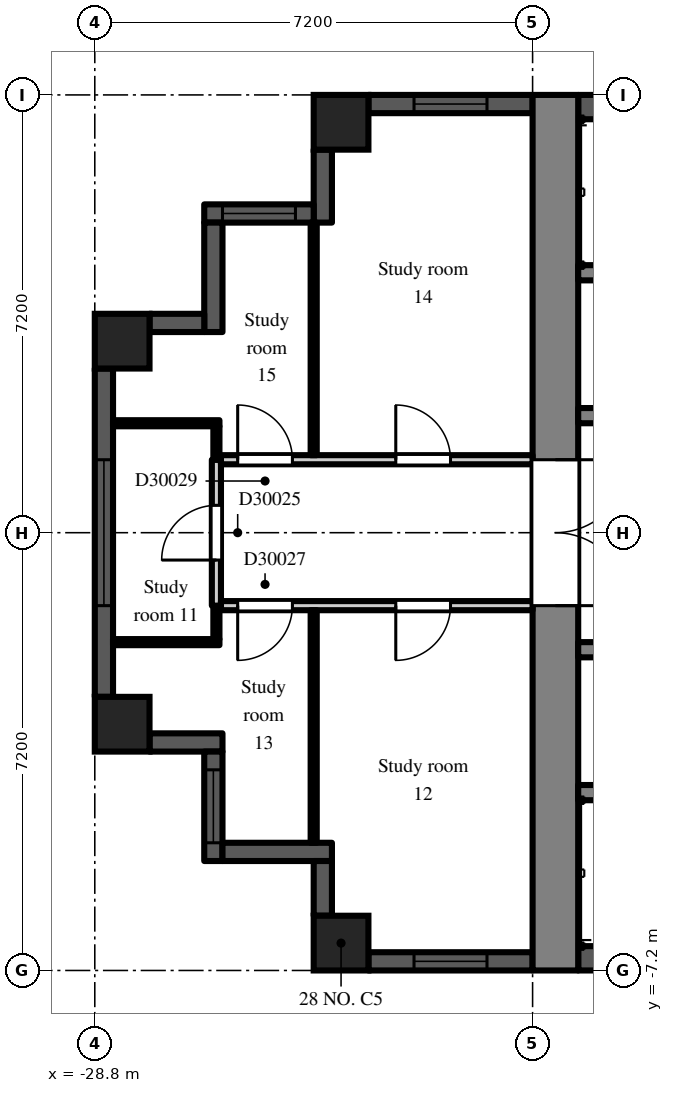
"""IFC4 building model, lengths in metres.
Left out: names, types, materials, properties, quantities, classifications, styles, units other than length and angle.
Written with IfcOpenShell. Run it as: python <this file> out.ifc"""

import sys

from ifc_helpers import new_model, si_unit, direction, frame, frame_2d, origin, origin_2d, place, context, subcontext, project, spatial, rectangle, extrude, element, fill, save


model = new_model("IFC4")
c1 = context("Model", 3, precision=1e-05, world=origin(), true_north=direction((0.0, 1.0)))
c2 = subcontext(c1, "Body", "Model", "MODEL_VIEW")
j1 = project(units=[si_unit("LENGTHUNIT", "METRE"), si_unit("PLANEANGLEUNIT", "RADIAN")], contexts=[c1])
p1 = place(None, origin())
s1 = spatial("IfcSite", under=j1, at=p1, CompositionType="ELEMENT")
p2 = place(p1, origin())
s2 = spatial("IfcBuilding", under=s1, at=p2, CompositionType="ELEMENT")
p3 = place(p2, frame((0.0, 0.0, 207.9)))
s3 = spatial("IfcBuildingStorey", under=s2, at=p3, CompositionType="ELEMENT", Elevation=207.9)
for number, where, z_axis, x_axis in (
    (1, (-28.35, -3.15, 0.0), (0.0, 0.0, 1.0), (1.0, 0.0, 0.0)),
    (2, (-28.35, 3.15, 0.0), (0.0, 0.0, 1.0), (1.0, 0.0, 0.0)),
    (3, (-24.75, -6.75, 0.0), (0.0, 0.0, 1.0), (1.0, 0.0, 0.0)),
    (4, (-24.75, 6.75, 0.0), (0.0, 0.0, 1.0), (1.0, 0.0, 0.0)),
):
    element("IfcColumn", number, at=place(p3, frame(where, z_axis=z_axis, x_axis=x_axis)), inside=s3, PredefinedType="COLUMN", context=c2, shape_type="SweptSolid", body=[
        extrude(rectangle(XDim=0.9, YDim=0.9, at=origin_2d()), origin(), (0.0, 0.0, 1.0), 3.0),
    ])
p4 = place(p3, frame((-21.6, 7.05, 0.0), z_axis=(0.0, 0.0, 1.0), x_axis=(-1.0, 0.0, 0.0)))
e5 = element("IfcWall", 5, at=p4, inside=s3, PredefinedType="SOLIDWALL", context=c2, shape_type="SweptSolid", body=[
    extrude(rectangle(XDim=2.7, YDim=0.3, at=frame_2d((1.35, 0.0))), origin(), (0.0, 0.0, 1.0), 2.3),
])
p5 = place(p4, frame((0.75, 0.0, 0.2)))
e6 = element("IfcOpeningElement", 6, at=p5, cuts=e5, PredefinedType="OPENING", context=c2, shape_type="SweptSolid", body=[
    extrude(rectangle(XDim=1.2, YDim=1.85, at=frame_2d((0.6, 0.925))), frame((0.0, 0.16, 0.0), z_axis=(0.0, -1.0, 0.0), x_axis=(1.0, 0.0, 0.0)), (0.0, 0.0, 1.0), 0.32),
])
p6 = place(p3, frame((-25.05, 6.3, 0.0), z_axis=(0.0, 0.0, 1.0), x_axis=(0.0, -1.0, 0.0)))
e7 = element("IfcWall", 7, at=p6, inside=s3, PredefinedType="SOLIDWALL", context=c2, shape_type="SweptSolid", body=[
    extrude(rectangle(XDim=1.2, YDim=0.3, at=frame_2d((0.6, 0.0))), origin(), (0.0, 0.0, 1.0), 2.6),
])
p7 = place(p3, frame((-25.2, 5.25, 0.0), z_axis=(0.0, 0.0, 1.0), x_axis=(-1.0, 0.0, 0.0)))
e8 = element("IfcWall", 8, at=p7, inside=s3, PredefinedType="SOLIDWALL", context=c2, shape_type="SweptSolid", body=[
    extrude(rectangle(XDim=1.8, YDim=0.3, at=frame_2d((0.9, 0.0))), origin(), (0.0, 0.0, 1.0), 2.6),
])
p8 = place(p7, frame((0.3, 0.0, 0.2)))
e9 = element("IfcOpeningElement", 9, at=p8, cuts=e8, PredefinedType="OPENING", context=c2, shape_type="SweptSolid", body=[
    extrude(rectangle(XDim=1.2, YDim=1.85, at=frame_2d((0.6, 0.925))), frame((0.0, 0.16, 0.0), z_axis=(0.0, -1.0, 0.0), x_axis=(1.0, 0.0, 0.0)), (0.0, 0.0, 1.0), 0.32),
])
p9 = place(p3, frame((-26.85, 5.1, 0.0), z_axis=(0.0, 0.0, 1.0), x_axis=(0.0, -1.0, 0.0)))
e10 = element("IfcWall", 10, at=p9, inside=s3, PredefinedType="SOLIDWALL", context=c2, shape_type="SweptSolid", body=[
    extrude(rectangle(XDim=1.8, YDim=0.3, at=frame_2d((0.9, 0.0))), origin(), (0.0, 0.0, 1.0), 2.6),
])
p10 = place(p3, frame((-27.0, 3.45, 0.0), z_axis=(0.0, 0.0, 1.0), x_axis=(-1.0, 0.0, 0.0)))
e11 = element("IfcWall", 11, at=p10, inside=s3, PredefinedType="SOLIDWALL", context=c2, shape_type="SweptSolid", body=[
    extrude(rectangle(XDim=0.9, YDim=0.3, at=frame_2d((0.45, 0.0))), origin(), (0.0, 0.0, 1.0), 2.6),
])
p11 = place(p3, frame((-28.65, 2.7, 0.0), z_axis=(0.0, 0.0, 1.0), x_axis=(0.0, -1.0, 0.0)))
e12 = element("IfcWall", 12, at=p11, inside=s3, PredefinedType="SOLIDWALL", context=c2, shape_type="SweptSolid", body=[
    extrude(rectangle(XDim=5.4, YDim=0.3, at=frame_2d((2.7, 0.0))), origin(), (0.0, 0.0, 1.0), 2.3),
])
p12 = place(p11, frame((1.5, 0.0, 0.2)))
e13 = element("IfcOpeningElement", 13, at=p12, cuts=e12, PredefinedType="OPENING", context=c2, shape_type="SweptSolid", body=[
    extrude(rectangle(XDim=2.4, YDim=1.85, at=frame_2d((1.2, 0.925))), frame((0.0, 0.16, 0.0), z_axis=(0.0, -1.0, 0.0), x_axis=(1.0, 0.0, 0.0)), (0.0, 0.0, 1.0), 0.32),
])
p13 = place(p3, frame((-27.9, -3.45, 0.0), z_axis=(0.0, 0.0, 1.0), x_axis=(1.0, 0.0, 0.0)))
e14 = element("IfcWall", 14, at=p13, inside=s3, PredefinedType="SOLIDWALL", context=c2, shape_type="SweptSolid", body=[
    extrude(rectangle(XDim=1.2, YDim=0.3, at=frame_2d((0.6, 0.0))), origin(), (0.0, 0.0, 1.0), 2.6),
])
p14 = place(p3, frame((-26.85, -3.6, 0.0), z_axis=(0.0, 0.0, 1.0), x_axis=(0.0, -1.0, 0.0)))
e15 = element("IfcWall", 15, at=p14, inside=s3, PredefinedType="SOLIDWALL", context=c2, shape_type="SweptSolid", body=[
    extrude(rectangle(XDim=1.8, YDim=0.3, at=frame_2d((0.9, 0.0))), origin(), (0.0, 0.0, 1.0), 2.6),
])
p15 = place(p14, frame((0.3, 0.0, 0.2)))
e16 = element("IfcOpeningElement", 16, at=p15, cuts=e15, PredefinedType="OPENING", context=c2, shape_type="SweptSolid", body=[
    extrude(rectangle(XDim=1.2, YDim=1.85, at=frame_2d((0.6, 0.925))), frame((0.0, 0.16, 0.0), z_axis=(0.0, -1.0, 0.0), x_axis=(1.0, 0.0, 0.0)), (0.0, 0.0, 1.0), 0.32),
])
p16 = place(p3, frame((-26.7, -5.25, 0.0), z_axis=(0.0, 0.0, 1.0), x_axis=(1.0, 0.0, 0.0)))
e17 = element("IfcWall", 17, at=p16, inside=s3, PredefinedType="SOLIDWALL", context=c2, shape_type="SweptSolid", body=[
    extrude(rectangle(XDim=1.8, YDim=0.3, at=frame_2d((0.9, 0.0))), origin(), (0.0, 0.0, 1.0), 2.6),
])
p17 = place(p3, frame((-25.05, -5.4, 0.0), z_axis=(0.0, 0.0, 1.0), x_axis=(0.0, -1.0, 0.0)))
e18 = element("IfcWall", 18, at=p17, inside=s3, PredefinedType="SOLIDWALL", context=c2, shape_type="SweptSolid", body=[
    extrude(rectangle(XDim=0.9, YDim=0.3, at=frame_2d((0.45, 0.0))), origin(), (0.0, 0.0, 1.0), 2.6),
])
p18 = place(p3, frame((-24.3, -7.05, 0.0), z_axis=(0.0, 0.0, 1.0), x_axis=(1.0, 0.0, 0.0)))
e19 = element("IfcWall", 19, at=p18, inside=s3, PredefinedType="SOLIDWALL", context=c2, shape_type="SweptSolid", body=[
    extrude(rectangle(XDim=2.7, YDim=0.3, at=frame_2d((1.35, 0.0))), origin(), (0.0, 0.0, 1.0), 2.3),
])
p19 = place(p18, frame((0.75, 0.0, 0.2)))
e20 = element("IfcOpeningElement", 20, at=p19, cuts=e19, PredefinedType="OPENING", context=c2, shape_type="SweptSolid", body=[
    extrude(rectangle(XDim=1.2, YDim=1.85, at=frame_2d((0.6, 0.925))), frame((0.0, 0.16, 0.0), z_axis=(0.0, -1.0, 0.0), x_axis=(1.0, 0.0, 0.0)), (0.0, 0.0, 1.0), 0.32),
])
p20 = place(p3, frame((-21.225, -7.2, 0.0), z_axis=(0.0, 0.0, 1.0), x_axis=(0.0, 1.0, 0.0)))
e21 = element("IfcWall", 21, at=p20, inside=s3, PredefinedType="SHEAR", context=c2, shape_type="SweptSolid", body=[
    extrude(rectangle(XDim=14.4, YDim=0.75, at=frame_2d((7.2, 0.0))), origin(), (0.0, 0.0, 1.0), 2.6),
])
p21 = place(p20, frame((6.0, 0.0, 0.0)))
e22 = element("IfcOpeningElement", 22, at=p21, cuts=e21, PredefinedType="OPENING", context=c2, shape_type="SweptSolid", body=[
    extrude(rectangle(XDim=2.4, YDim=2.2, at=frame_2d((1.2, 1.1))), frame((0.0, 0.385, 0.0), z_axis=(0.0, -1.0, 0.0), x_axis=(1.0, 0.0, 0.0)), (0.0, 0.0, 1.0), 0.77),
])
p22 = place(p3, frame((-7.9, 7.0, 0.0), z_axis=(0.0, 0.0, 1.0), x_axis=(-1.0, 0.0, 0.0)))
e23 = element("IfcWall", 23, at=p22, inside=s3, PredefinedType="SHEAR", context=c2, shape_type="SweptSolid", body=[
    extrude(rectangle(XDim=12.95, YDim=0.4, at=frame_2d((6.475, 0.0))), origin(), (0.0, 0.0, 1.0), 2.6),
])
p23 = place(p3, frame((-7.9, 1.925, 0.0), z_axis=(0.0, 0.0, 1.0), x_axis=(-1.0, 0.0, 0.0)))
e24 = element("IfcWall", 24, at=p23, inside=s3, PredefinedType="SHEAR", context=c2, shape_type="SweptSolid", body=[
    extrude(rectangle(XDim=12.95, YDim=0.25, at=frame_2d((6.475, 0.0))), origin(), (0.0, 0.0, 1.0), 2.6),
])
p24 = place(p23, frame((4.825, 0.0, 0.0)))
e25 = element("IfcOpeningElement", 25, at=p24, cuts=e24, PredefinedType="OPENING", context=c2, shape_type="SweptSolid", body=[
    extrude(rectangle(XDim=1.1, YDim=2.1, at=frame_2d((0.55, 1.05))), frame((0.0, 0.135, 0.0), z_axis=(0.0, -1.0, 0.0), x_axis=(1.0, 0.0, 0.0)), (0.0, 0.0, 1.0), 0.27),
])
p25 = place(p23, frame((7.025, 0.0, 0.0)))
e26 = element("IfcOpeningElement", 26, at=p25, cuts=e24, PredefinedType="OPENING", context=c2, shape_type="SweptSolid", body=[
    extrude(rectangle(XDim=1.1, YDim=2.1, at=frame_2d((0.55, 1.05))), frame((0.0, 0.135, 0.0), z_axis=(0.0, -1.0, 0.0), x_axis=(1.0, 0.0, 0.0)), (0.0, 0.0, 1.0), 0.27),
])
p26 = place(p23, frame((9.225, 0.0, 0.0)))
e27 = element("IfcOpeningElement", 27, at=p26, cuts=e24, PredefinedType="OPENING", context=c2, shape_type="SweptSolid", body=[
    extrude(rectangle(XDim=1.1, YDim=2.1, at=frame_2d((0.55, 1.05))), frame((0.0, 0.135, 0.0), z_axis=(0.0, -1.0, 0.0), x_axis=(1.0, 0.0, 0.0)), (0.0, 0.0, 1.0), 0.27),
])
p27 = place(p23, frame((0.525, 0.0, 0.0)))
e28 = element("IfcOpeningElement", 28, at=p27, cuts=e24, PredefinedType="OPENING", context=c2, shape_type="SweptSolid", body=[
    extrude(rectangle(XDim=0.9, YDim=2.1, at=frame_2d((0.45, 1.05))), frame((0.0, 0.135, 0.0), z_axis=(0.0, -1.0, 0.0), x_axis=(1.0, 0.0, 0.0)), (0.0, 0.0, 1.0), 0.27),
])
p28 = place(p23, frame((2.625, 0.0, 0.0)))
e29 = element("IfcOpeningElement", 29, at=p28, cuts=e24, PredefinedType="OPENING", context=c2, shape_type="SweptSolid", body=[
    extrude(rectangle(XDim=1.1, YDim=2.1, at=frame_2d((0.55, 1.05))), frame((0.0, 0.135, 0.0), z_axis=(0.0, -1.0, 0.0), x_axis=(1.0, 0.0, 0.0)), (0.0, 0.0, 1.0), 0.27),
])
p29 = place(p23, frame((11.525, 0.0, 0.0)))
e30 = element("IfcOpeningElement", 30, at=p29, cuts=e24, PredefinedType="OPENING", context=c2, shape_type="SweptSolid", body=[
    extrude(rectangle(XDim=0.9, YDim=2.1, at=frame_2d((0.45, 1.05))), frame((0.0, 0.135, 0.0), z_axis=(0.0, -1.0, 0.0), x_axis=(1.0, 0.0, 0.0)), (0.0, 0.0, 1.0), 0.27),
])
p30 = place(p3, frame((-12.3, 4.275, 0.0), z_axis=(0.0, 0.0, 1.0), x_axis=(-1.0, 0.0, 0.0)))
e31 = element("IfcWall", 31, at=p30, inside=s3, PredefinedType="SHEAR", context=c2, shape_type="SweptSolid", body=[
    extrude(rectangle(XDim=8.55, YDim=0.25, at=frame_2d((4.275, 0.0))), origin(), (0.0, 0.0, 1.0), 2.6),
])
p31 = place(p3, frame((-7.9, -7.0, 0.0), z_axis=(0.0, 0.0, 1.0), x_axis=(-1.0, 0.0, 0.0)))
e32 = element("IfcWall", 32, at=p31, inside=s3, PredefinedType="SHEAR", context=c2, shape_type="SweptSolid", body=[
    extrude(rectangle(XDim=12.95, YDim=0.4, at=frame_2d((6.475, 0.0))), origin(), (0.0, 0.0, 1.0), 2.6),
])
p32 = place(p3, frame((-7.9, -1.925, 0.0), z_axis=(0.0, 0.0, 1.0), x_axis=(-1.0, 0.0, 0.0)))
e33 = element("IfcWall", 33, at=p32, inside=s3, PredefinedType="SHEAR", context=c2, shape_type="SweptSolid", body=[
    extrude(rectangle(XDim=12.95, YDim=0.25, at=frame_2d((6.475, 0.0))), origin(), (0.0, 0.0, 1.0), 2.6),
])
p33 = place(p32, frame((0.525, 0.0, 0.0)))
e34 = element("IfcOpeningElement", 34, at=p33, cuts=e33, PredefinedType="OPENING", context=c2, shape_type="SweptSolid", body=[
    extrude(rectangle(XDim=0.9, YDim=2.1, at=frame_2d((0.45, 1.05))), frame((0.0, 0.135, 0.0), z_axis=(0.0, -1.0, 0.0), x_axis=(1.0, 0.0, 0.0)), (0.0, 0.0, 1.0), 0.27),
])
p34 = place(p32, frame((2.625, 0.0, 0.0)))
e35 = element("IfcOpeningElement", 35, at=p34, cuts=e33, PredefinedType="OPENING", context=c2, shape_type="SweptSolid", body=[
    extrude(rectangle(XDim=1.1, YDim=2.1, at=frame_2d((0.55, 1.05))), frame((0.0, 0.135, 0.0), z_axis=(0.0, -1.0, 0.0), x_axis=(1.0, 0.0, 0.0)), (0.0, 0.0, 1.0), 0.27),
])
p35 = place(p32, frame((4.925, 0.0, 0.0)))
e36 = element("IfcOpeningElement", 36, at=p35, cuts=e33, PredefinedType="OPENING", context=c2, shape_type="SweptSolid", body=[
    extrude(rectangle(XDim=0.9, YDim=2.1, at=frame_2d((0.45, 1.05))), frame((0.0, 0.135, 0.0), z_axis=(0.0, -1.0, 0.0), x_axis=(1.0, 0.0, 0.0)), (0.0, 0.0, 1.0), 0.27),
])
p36 = place(p32, frame((8.225, 0.0, 0.0)))
e37 = element("IfcOpeningElement", 37, at=p36, cuts=e33, PredefinedType="OPENING", context=c2, shape_type="SweptSolid", body=[
    extrude(rectangle(XDim=0.9, YDim=2.1, at=frame_2d((0.45, 1.05))), frame((0.0, 0.135, 0.0), z_axis=(0.0, -1.0, 0.0), x_axis=(1.0, 0.0, 0.0)), (0.0, 0.0, 1.0), 0.27),
])
p37 = place(p32, frame((11.525, 0.0, 0.0)))
e38 = element("IfcOpeningElement", 38, at=p37, cuts=e33, PredefinedType="OPENING", context=c2, shape_type="SweptSolid", body=[
    extrude(rectangle(XDim=0.9, YDim=2.1, at=frame_2d((0.45, 1.05))), frame((0.0, 0.135, 0.0), z_axis=(0.0, -1.0, 0.0), x_axis=(1.0, 0.0, 0.0)), (0.0, 0.0, 1.0), 0.27),
])
p38 = place(p3, frame((-12.3, -4.275, 0.0), z_axis=(0.0, 0.0, 1.0), x_axis=(-1.0, 0.0, 0.0)))
e39 = element("IfcWall", 39, at=p38, inside=s3, PredefinedType="SHEAR", context=c2, shape_type="SweptSolid", body=[
    extrude(rectangle(XDim=8.55, YDim=0.25, at=frame_2d((4.275, 0.0))), origin(), (0.0, 0.0, 1.0), 2.6),
])
for number, where, z_axis, x_axis in (
    (40, (-28.5, -1.8, 0.0), (0.0, 0.0, 1.0), (1.0, 0.0, 0.0)),
    (41, (-28.5, 1.8, 0.0), (0.0, 0.0, 1.0), (1.0, 0.0, 0.0)),
):
    element("IfcWall", number, at=place(p3, frame(where, z_axis=z_axis, x_axis=x_axis)), inside=s3, PredefinedType="PARTITIONING", context=c2, shape_type="SweptSolid", body=[
        extrude(rectangle(XDim=1.75, YDim=0.1, at=frame_2d((0.875, 0.0))), origin(), (0.0, 0.0, 1.0), 2.6),
    ])
p39 = place(p3, frame((-26.8, -1.75, 0.0), z_axis=(0.0, 0.0, 1.0), x_axis=(0.0, 1.0, 0.0)))
e42 = element("IfcWall", 42, at=p39, inside=s3, PredefinedType="PARTITIONING", context=c2, shape_type="SweptSolid", body=[
    extrude(rectangle(XDim=0.55, YDim=0.1, at=frame_2d((0.275, 0.0))), origin(), (0.0, 0.0, 1.0), 2.6),
])
p40 = place(p3, frame((-26.8, -1.2, 0.0), z_axis=(0.0, 0.0, 1.0), x_axis=(0.0, 1.0, 0.0)))
e43 = element("IfcWall", 43, at=p40, inside=s3, PredefinedType="PARTITIONING", context=c2, shape_type="SweptSolid", body=[
    extrude(rectangle(XDim=2.4, YDim=0.15, at=frame_2d((1.2, 0.0))), origin(), (0.0, 0.0, 1.0), 2.6),
])
p41 = place(p40, frame((0.75, 0.0, 0.0)))
e44 = element("IfcOpeningElement", 44, at=p41, cuts=e43, PredefinedType="OPENING", context=c2, shape_type="SweptSolid", body=[
    extrude(rectangle(XDim=0.9, YDim=2.1, at=frame_2d((0.45, 1.05))), frame((0.0, 0.085, 0.0), z_axis=(0.0, -1.0, 0.0), x_axis=(1.0, 0.0, 0.0)), (0.0, 0.0, 1.0), 0.17),
])
p42 = place(p3, frame((-26.725, -1.2, 0.0), z_axis=(0.0, 0.0, 1.0), x_axis=(1.0, 0.0, 0.0)))
e45 = element("IfcWall", 45, at=p42, inside=s3, PredefinedType="PARTITIONING", context=c2, shape_type="SweptSolid", body=[
    extrude(rectangle(XDim=5.125, YDim=0.15, at=frame_2d((2.562, 0.0))), origin(), (0.0, 0.0, 1.0), 2.6),
])
p43 = place(p42, frame((2.875, 0.0, 0.0)))
e46 = element("IfcOpeningElement", 46, at=p43, cuts=e45, PredefinedType="OPENING", context=c2, shape_type="SweptSolid", body=[
    extrude(rectangle(XDim=0.9, YDim=2.1, at=frame_2d((0.45, 1.05))), frame((0.0, 0.085, 0.0), z_axis=(0.0, -1.0, 0.0), x_axis=(1.0, 0.0, 0.0)), (0.0, 0.0, 1.0), 0.17),
])
p44 = place(p42, frame((0.275, 0.0, 0.0)))
e47 = element("IfcOpeningElement", 47, at=p44, cuts=e45, PredefinedType="OPENING", context=c2, shape_type="SweptSolid", body=[
    extrude(rectangle(XDim=0.9, YDim=2.1, at=frame_2d((0.45, 1.05))), frame((0.0, 0.085, 0.0), z_axis=(0.0, -1.0, 0.0), x_axis=(1.0, 0.0, 0.0)), (0.0, 0.0, 1.0), 0.17),
])
p45 = place(p3, frame((-26.8, 1.2, 0.0), z_axis=(0.0, 0.0, 1.0), x_axis=(0.0, 1.0, 0.0)))
e48 = element("IfcWall", 48, at=p45, inside=s3, PredefinedType="PARTITIONING", context=c2, shape_type="SweptSolid", body=[
    extrude(rectangle(XDim=0.55, YDim=0.1, at=frame_2d((0.275, 0.0))), origin(), (0.0, 0.0, 1.0), 2.6),
])
p46 = place(p3, frame((-26.725, 1.2, 0.0), z_axis=(0.0, 0.0, 1.0), x_axis=(1.0, 0.0, 0.0)))
e49 = element("IfcWall", 49, at=p46, inside=s3, PredefinedType="PARTITIONING", context=c2, shape_type="SweptSolid", body=[
    extrude(rectangle(XDim=5.125, YDim=0.15, at=frame_2d((2.562, 0.0))), origin(), (0.0, 0.0, 1.0), 2.6),
])
p47 = place(p46, frame((2.875, 0.0, 0.0)))
e50 = element("IfcOpeningElement", 50, at=p47, cuts=e49, PredefinedType="OPENING", context=c2, shape_type="SweptSolid", body=[
    extrude(rectangle(XDim=0.9, YDim=2.1, at=frame_2d((0.45, 1.05))), frame((0.0, 0.085, 0.0), z_axis=(0.0, -1.0, 0.0), x_axis=(1.0, 0.0, 0.0)), (0.0, 0.0, 1.0), 0.17),
])
p48 = place(p46, frame((0.275, 0.0, 0.0)))
e51 = element("IfcOpeningElement", 51, at=p48, cuts=e49, PredefinedType="OPENING", context=c2, shape_type="SweptSolid", body=[
    extrude(rectangle(XDim=0.9, YDim=2.1, at=frame_2d((0.45, 1.05))), frame((0.0, 0.085, 0.0), z_axis=(0.0, -1.0, 0.0), x_axis=(1.0, 0.0, 0.0)), (0.0, 0.0, 1.0), 0.17),
])
for number, where, z_axis, x_axis in (
    (52, (-25.2, -5.1, 0.0), (0.0, 0.0, 1.0), (0.0, 1.0, 0.0)),
    (53, (-25.2, 1.275, 0.0), (0.0, 0.0, 1.0), (0.0, 1.0, 0.0)),
):
    element("IfcWall", number, at=place(p3, frame(where, z_axis=z_axis, x_axis=x_axis)), inside=s3, PredefinedType="PARTITIONING", context=c2, shape_type="SweptSolid", body=[
        extrude(rectangle(XDim=3.825, YDim=0.1, at=frame_2d((1.913, 0.0))), origin(), (0.0, 0.0, 1.0), 2.6),
    ])
p49 = place(p5, origin())
e54 = element("IfcWindow", 54, at=p49, inside=s3, PartitioningType="SINGLE_PANEL", PredefinedType="WINDOW", context=c2, shape_type="SweptSolid", body=[
    extrude(rectangle(XDim=1.2, YDim=1.85, at=frame_2d((0.6, 0.925))), frame((0.0, 0.03, 0.0), z_axis=(0.0, -1.0, 0.0), x_axis=(1.0, 0.0, 0.0)), (0.0, 0.0, 1.0), 0.06),
])
fill(e6, e54)
p50 = place(p8, origin())
e55 = element("IfcWindow", 55, at=p50, inside=s3, PartitioningType="SINGLE_PANEL", PredefinedType="WINDOW", context=c2, shape_type="SweptSolid", body=[
    extrude(rectangle(XDim=1.2, YDim=1.85, at=frame_2d((0.6, 0.925))), frame((0.0, 0.03, 0.0), z_axis=(0.0, -1.0, 0.0), x_axis=(1.0, 0.0, 0.0)), (0.0, 0.0, 1.0), 0.06),
])
fill(e9, e55)
p51 = place(p12, origin())
e56 = element("IfcWindow", 56, at=p51, inside=s3, PartitioningType="SINGLE_PANEL", PredefinedType="WINDOW", context=c2, shape_type="SweptSolid", body=[
    extrude(rectangle(XDim=2.4, YDim=1.85, at=frame_2d((1.2, 0.925))), frame((0.0, 0.03, 0.0), z_axis=(0.0, -1.0, 0.0), x_axis=(1.0, 0.0, 0.0)), (0.0, 0.0, 1.0), 0.06),
])
fill(e13, e56)
p52 = place(p15, origin())
e57 = element("IfcWindow", 57, at=p52, inside=s3, PartitioningType="SINGLE_PANEL", PredefinedType="WINDOW", context=c2, shape_type="SweptSolid", body=[
    extrude(rectangle(XDim=1.2, YDim=1.85, at=frame_2d((0.6, 0.925))), frame((0.0, 0.03, 0.0), z_axis=(0.0, -1.0, 0.0), x_axis=(1.0, 0.0, 0.0)), (0.0, 0.0, 1.0), 0.06),
])
fill(e16, e57)
p53 = place(p19, origin())
e58 = element("IfcWindow", 58, at=p53, inside=s3, PartitioningType="SINGLE_PANEL", PredefinedType="WINDOW", context=c2, shape_type="SweptSolid", body=[
    extrude(rectangle(XDim=1.2, YDim=1.85, at=frame_2d((0.6, 0.925))), frame((0.0, 0.03, 0.0), z_axis=(0.0, -1.0, 0.0), x_axis=(1.0, 0.0, 0.0)), (0.0, 0.0, 1.0), 0.06),
])
fill(e20, e58)
p54 = place(p21, frame((2.4, 0.0, 0.0), z_axis=(0.0, 0.0, 1.0), x_axis=(-1.0, 0.0, 0.0)))
e59 = element("IfcDoor", 59, at=p54, inside=s3, OperationType="DOUBLE_DOOR_DOUBLE_SWING", PredefinedType="DOOR", context=c2, shape_type="SweptSolid", body=[
    extrude(rectangle(XDim=2.4, YDim=2.2, at=frame_2d((1.2, 1.1))), frame((0.0, 0.025, 0.0), z_axis=(0.0, -1.0, 0.0), x_axis=(1.0, 0.0, 0.0)), (0.0, 0.0, 1.0), 0.05),
])
fill(e22, e59)
p55 = place(p41, origin())
e60 = element("IfcDoor", 60, at=p55, inside=s3, OperationType="SINGLE_SWING_LEFT", PredefinedType="DOOR", context=c2, shape_type="SweptSolid", body=[
    extrude(rectangle(XDim=0.9, YDim=2.1, at=frame_2d((0.45, 1.05))), frame((0.0, 0.025, 0.0), z_axis=(0.0, -1.0, 0.0), x_axis=(1.0, 0.0, 0.0)), (0.0, 0.0, 1.0), 0.05),
])
fill(e44, e60)
p56 = place(p43, frame((0.9, 0.0, 0.0), z_axis=(0.0, 0.0, 1.0), x_axis=(-1.0, 0.0, 0.0)))
e61 = element("IfcDoor", 61, at=p56, inside=s3, OperationType="SINGLE_SWING_RIGHT", PredefinedType="DOOR", context=c2, shape_type="SweptSolid", body=[
    extrude(rectangle(XDim=0.9, YDim=2.1, at=frame_2d((0.45, 1.05))), frame((0.0, 0.025, 0.0), z_axis=(0.0, -1.0, 0.0), x_axis=(1.0, 0.0, 0.0)), (0.0, 0.0, 1.0), 0.05),
])
fill(e46, e61)
p57 = place(p44, frame((0.9, 0.0, 0.0), z_axis=(0.0, 0.0, 1.0), x_axis=(-1.0, 0.0, 0.0)))
e62 = element("IfcDoor", 62, at=p57, inside=s3, OperationType="SINGLE_SWING_RIGHT", PredefinedType="DOOR", context=c2, shape_type="SweptSolid", body=[
    extrude(rectangle(XDim=0.9, YDim=2.1, at=frame_2d((0.45, 1.05))), frame((0.0, 0.025, 0.0), z_axis=(0.0, -1.0, 0.0), x_axis=(1.0, 0.0, 0.0)), (0.0, 0.0, 1.0), 0.05),
])
fill(e47, e62)
p58 = place(p47, origin())
e63 = element("IfcDoor", 63, at=p58, inside=s3, OperationType="SINGLE_SWING_LEFT", PredefinedType="DOOR", context=c2, shape_type="SweptSolid", body=[
    extrude(rectangle(XDim=0.9, YDim=2.1, at=frame_2d((0.45, 1.05))), frame((0.0, 0.025, 0.0), z_axis=(0.0, -1.0, 0.0), x_axis=(1.0, 0.0, 0.0)), (0.0, 0.0, 1.0), 0.05),
])
fill(e50, e63)
p59 = place(p48, origin())
e64 = element("IfcDoor", 64, at=p59, inside=s3, OperationType="SINGLE_SWING_LEFT", PredefinedType="DOOR", context=c2, shape_type="SweptSolid", body=[
    extrude(rectangle(XDim=0.9, YDim=2.1, at=frame_2d((0.45, 1.05))), frame((0.0, 0.025, 0.0), z_axis=(0.0, -1.0, 0.0), x_axis=(1.0, 0.0, 0.0)), (0.0, 0.0, 1.0), 0.05),
])
fill(e51, e64)
save(model, sys.argv[1])
